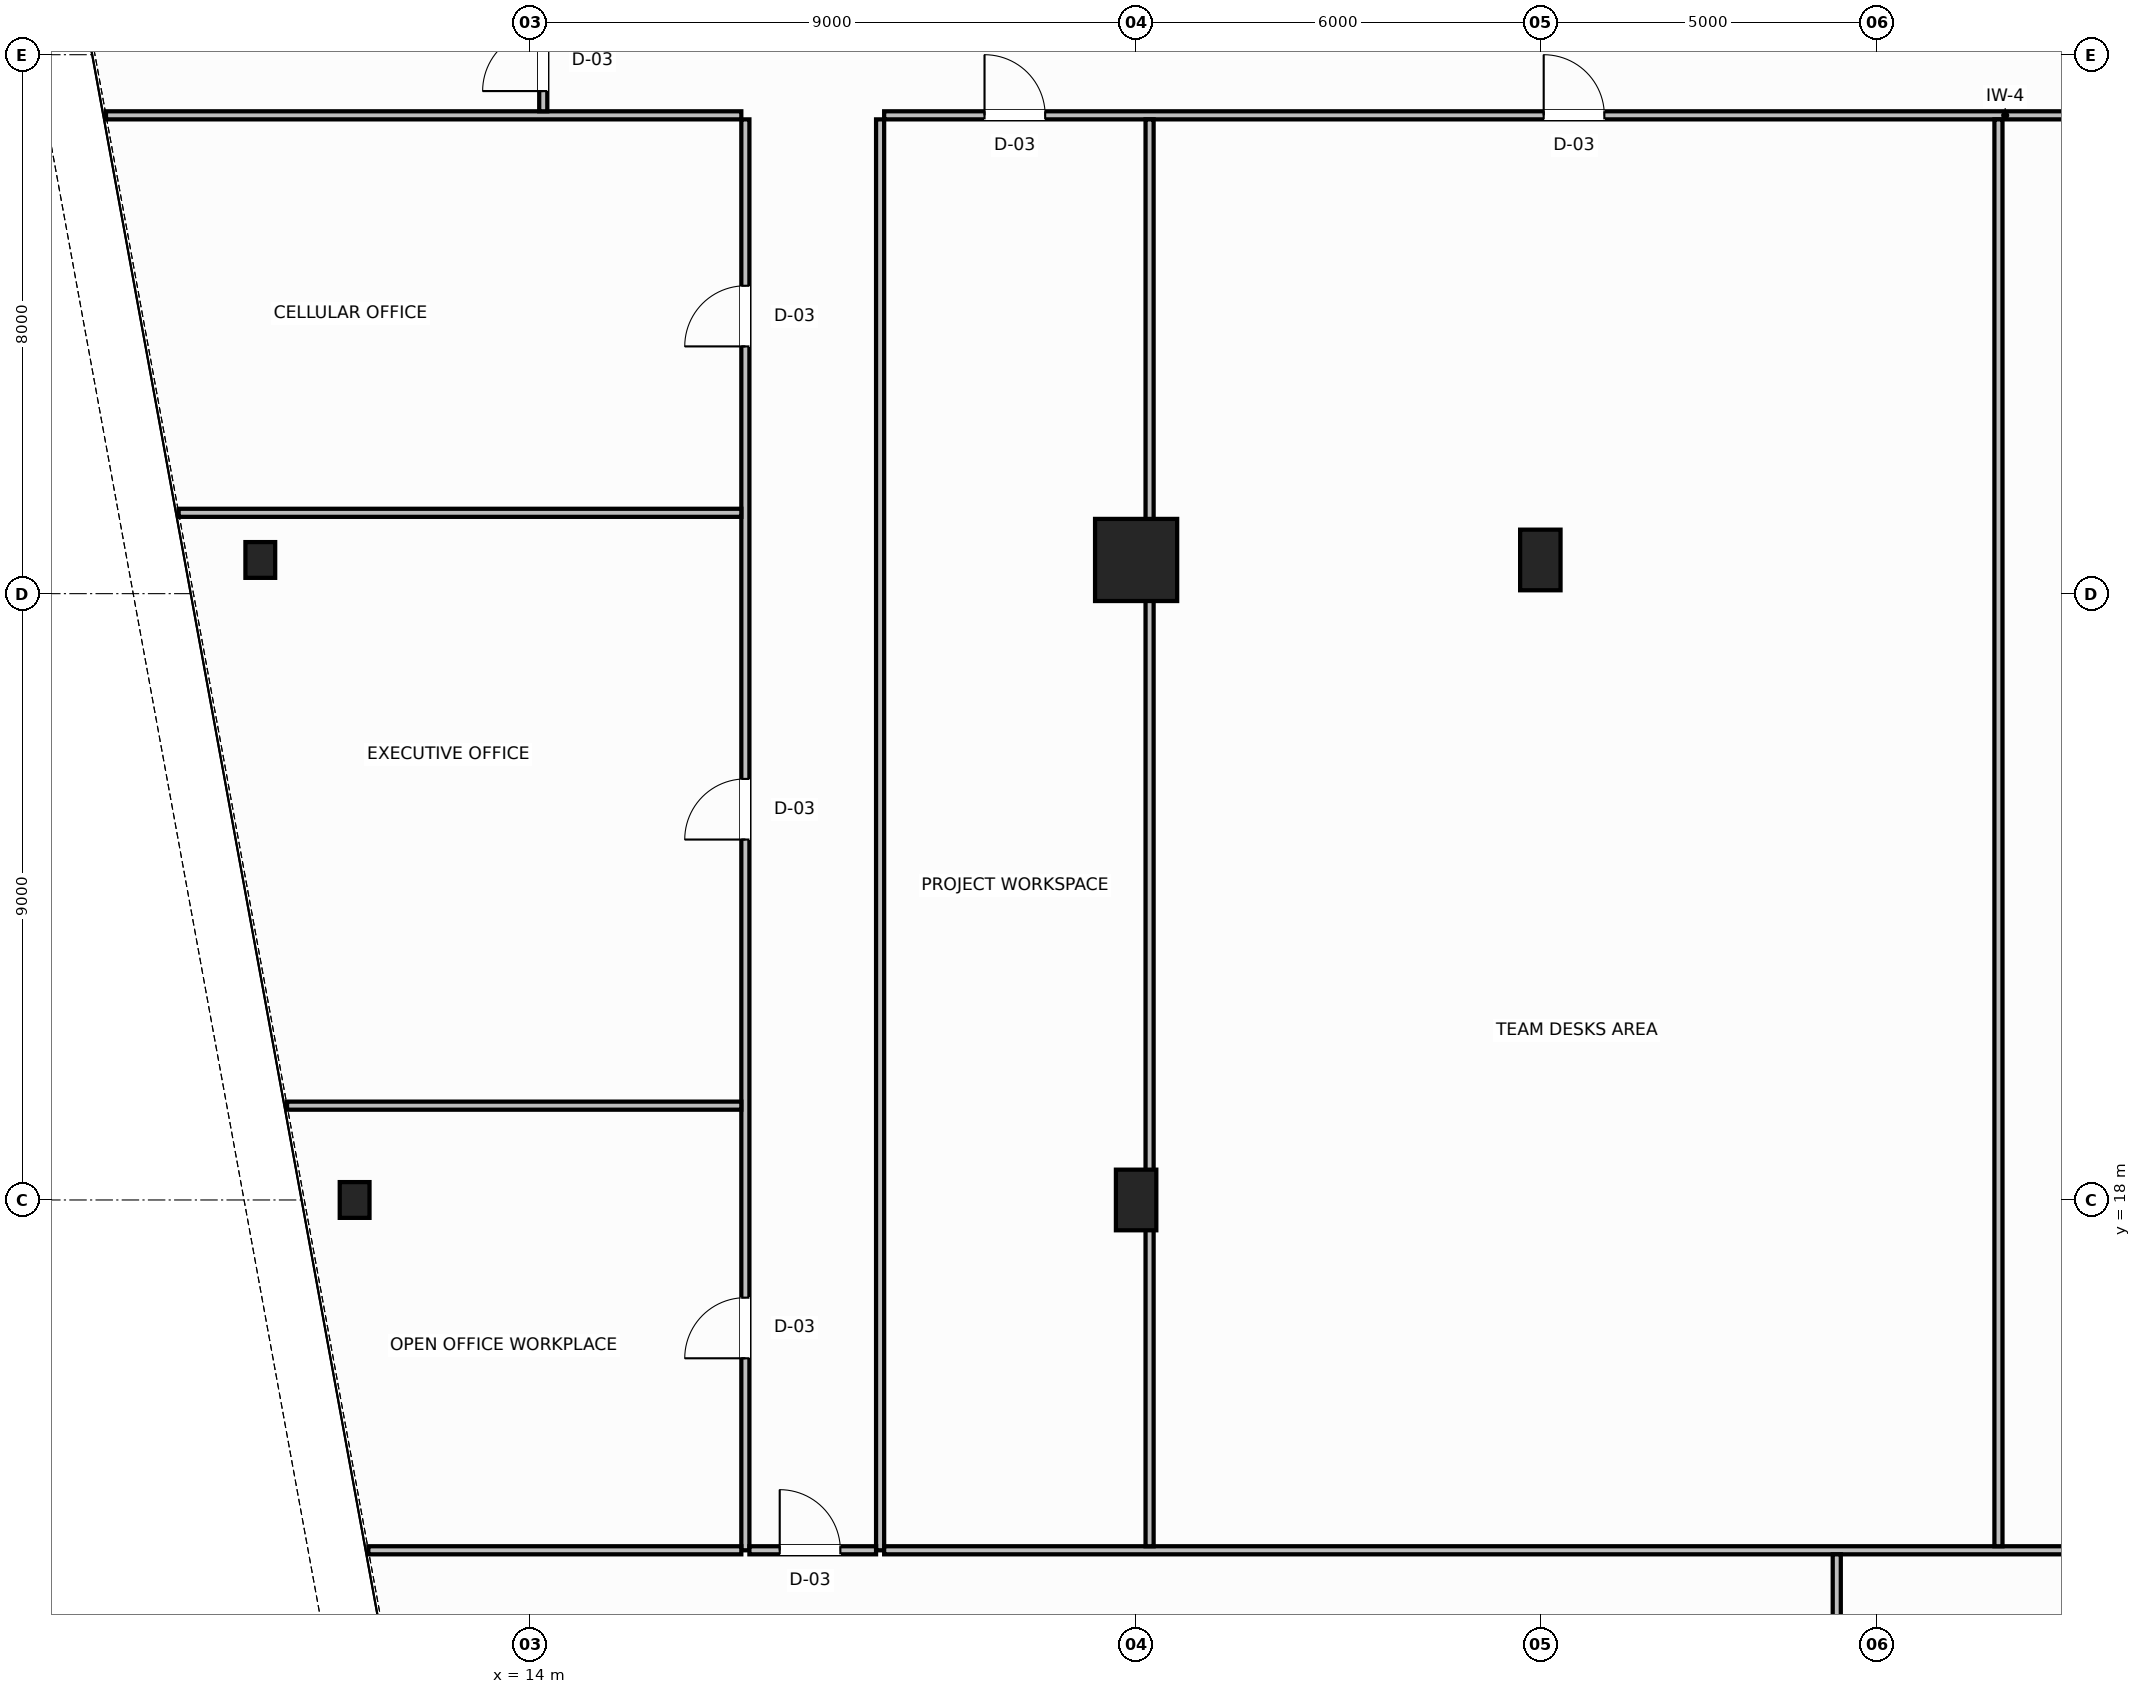
"""IFC4 building model, lengths in metres.
Left out: names, types, materials, properties, quantities, classifications, styles, units other than length and angle.
Written with IfcOpenShell. Run it as: python <this file> out.ifc"""

import sys

from ifc_helpers import new_model, si_unit, direction, frame, frame_2d, origin, origin_2d, place, context, subcontext, project, spatial, rectangle, hollow_rectangle, hollow_circle, i_section, extrude, source, transform, mapped, element, fill, save


model = new_model("IFC4")
c1 = context("Model", 3, precision=1e-05, world=origin(), true_north=direction((0.0, 1.0)))
c2 = subcontext(c1, "Body", "Model", "MODEL_VIEW")
j1 = project(units=[si_unit("LENGTHUNIT", "METRE"), si_unit("PLANEANGLEUNIT", "RADIAN")], contexts=[c1])
p1 = place(None, origin())
s1 = spatial("IfcSite", under=j1, at=p1, CompositionType="ELEMENT")
p2 = place(p1, origin())
s2 = spatial("IfcBuilding", under=s1, at=p2, CompositionType="ELEMENT")
p3 = place(p2, frame((0.0, 0.0, 79.6)))
s3 = spatial("IfcBuildingStorey", under=s2, at=p3, CompositionType="ELEMENT", Elevation=79.6)
m1 = source(origin(), c2, "Body", "SweptSolid", [
    extrude(i_section(OverallWidth=0.442, OverallDepth=0.531, WebThickness=0.065, FlangeThickness=0.076, FilletRadius=0.015, at=origin_2d()), origin(), (0.0, 0.0, 1.0), 3.8),
])
for number, where, z_axis, x_axis in (
    (1, (10.0, 27.5, 0.0), (0.0, 0.0, 1.0), (1.0, 0.0, 0.0)),
    (2, (11.4, 18.0, 0.0), (0.0, 0.0, 1.0), (1.0, 0.0, 0.0)),
):
    element("IfcColumn", number, at=place(p3, frame(where, z_axis=z_axis, x_axis=x_axis)), inside=s3, PredefinedType="COLUMN", context=c2, shape_type="MappedRepresentation", body=[
        mapped(m1, transform((0.0, 0.0, 0.0), scale=1.0)),
    ])
m2 = source(origin(), c2, "Body", "SweptSolid", [
    extrude(hollow_circle(Radius=0.61, WallThickness=0.05, at=origin_2d()), origin(), (0.0, 0.0, 1.0), 3.8),
])
p4 = place(p3, frame((23.0, 27.5, 0.0), z_axis=(0.0, 0.0, 1.0), x_axis=(1.0, 0.0, 0.0)))
e3 = element("IfcColumn", 3, at=p4, inside=s3, PredefinedType="COLUMN", context=c2, shape_type="MappedRepresentation", body=[
    mapped(m2, transform((0.0, 0.0, 0.0), scale=1.0)),
])
m3 = source(origin(), c2, "Body", "SweptSolid", [
    extrude(hollow_rectangle(XDim=0.6, YDim=0.9, WallThickness=0.04, InnerFilletRadius=0.04, OuterFilletRadius=0.08, at=origin_2d()), origin(), (0.0, 0.0, 1.0), 3.8),
])
for number, where, z_axis, x_axis in (
    (4, (29.0, 27.5, 0.0), (0.0, 0.0, 1.0), (1.0, 0.0, 0.0)),
    (5, (23.0, 18.0, 0.0), (0.0, 0.0, 1.0), (1.0, 0.0, 0.0)),
):
    element("IfcColumn", number, at=place(p3, frame(where, z_axis=z_axis, x_axis=x_axis)), inside=s3, PredefinedType="COLUMN", context=c2, shape_type="MappedRepresentation", body=[
        mapped(m3, transform((0.0, 0.0, 0.0), scale=1.0)),
    ])
p5 = place(p3, frame((19.26, 34.1, 0.0), z_axis=(0.0, 0.0, 1.0), x_axis=(1.0, 0.0, 0.0)))
e6 = element("IfcWall", 6, at=p5, inside=s3, PredefinedType="PARTITIONING", context=c2, shape_type="SweptSolid", body=[
    extrude(rectangle(XDim=29.48, YDim=0.12, at=frame_2d((14.74, 0.0))), origin(), (0.0, 0.0, 1.0), 3.54),
])
p6 = place(p5, frame((1.49, 0.0, 0.0)))
e7 = element("IfcOpeningElement", 7, at=p6, cuts=e6, PredefinedType="OPENING", context=c2, shape_type="SweptSolid", body=[
    extrude(rectangle(XDim=0.9, YDim=2.15, at=frame_2d((0.45, 1.075))), frame((0.0, 0.07, 0.0), z_axis=(0.0, -1.0, 0.0), x_axis=(1.0, 0.0, 0.0)), (0.0, 0.0, 1.0), 0.14),
])
p7 = place(p5, frame((9.79, 0.0, 0.0)))
e8 = element("IfcOpeningElement", 8, at=p7, cuts=e6, PredefinedType="OPENING", context=c2, shape_type="SweptSolid", body=[
    extrude(rectangle(XDim=0.9, YDim=2.15, at=frame_2d((0.45, 1.075))), frame((0.0, 0.07, 0.0), z_axis=(0.0, -1.0, 0.0), x_axis=(1.0, 0.0, 0.0)), (0.0, 0.0, 1.0), 0.14),
])
p8 = place(p5, frame((22.59, 0.0, 0.0)))
e9 = element("IfcOpeningElement", 9, at=p8, cuts=e6, PredefinedType="OPENING", context=c2, shape_type="SweptSolid", body=[
    extrude(rectangle(XDim=0.9, YDim=2.15, at=frame_2d((0.45, 1.075))), frame((0.0, 0.07, 0.0), z_axis=(0.0, -1.0, 0.0), x_axis=(1.0, 0.0, 0.0)), (0.0, 0.0, 1.0), 0.14),
])
p9 = place(p3, frame((7.709, 34.1, 0.0), z_axis=(0.0, 0.0, 1.0), x_axis=(1.0, 0.0, 0.0)))
e10 = element("IfcWall", 10, at=p9, inside=s3, PredefinedType="PARTITIONING", context=c2, shape_type="SweptSolid", body=[
    extrude(rectangle(XDim=9.431, YDim=0.12, at=frame_2d((4.715, 0.0))), origin(), (0.0, 0.0, 1.0), 3.54),
])
p10 = place(p3, frame((14.2, 34.16, 0.0), z_axis=(0.0, 0.0, 1.0), x_axis=(0.0, 1.0, 0.0)))
e11 = element("IfcWall", 11, at=p10, inside=s3, PredefinedType="PARTITIONING", context=c2, shape_type="SweptSolid", body=[
    extrude(rectangle(XDim=2.28, YDim=0.12, at=frame_2d((1.14, 0.0))), origin(), (0.0, 0.0, 1.0), 3.54),
])
p11 = place(p10, frame((0.3, 0.0, 0.0)))
e12 = element("IfcOpeningElement", 12, at=p11, cuts=e11, PredefinedType="OPENING", context=c2, shape_type="SweptSolid", body=[
    extrude(rectangle(XDim=0.9, YDim=2.15, at=frame_2d((0.45, 1.075))), frame((0.0, 0.07, 0.0), z_axis=(0.0, -1.0, 0.0), x_axis=(1.0, 0.0, 0.0)), (0.0, 0.0, 1.0), 0.14),
])
p12 = place(p3, frame((17.2, 12.8, 0.0), z_axis=(0.0, 0.0, 1.0), x_axis=(0.0, 1.0, 0.0)))
e13 = element("IfcWall", 13, at=p12, inside=s3, PredefinedType="PARTITIONING", context=c2, shape_type="SweptSolid", body=[
    extrude(rectangle(XDim=21.24, YDim=0.12, at=frame_2d((10.62, 0.0))), origin(), (0.0, 0.0, 1.0), 3.54),
])
p13 = place(p12, frame((2.85, 0.0, 0.0)))
e14 = element("IfcOpeningElement", 14, at=p13, cuts=e13, PredefinedType="OPENING", context=c2, shape_type="SweptSolid", body=[
    extrude(rectangle(XDim=0.9, YDim=2.15, at=frame_2d((0.45, 1.075))), frame((0.0, 0.07, 0.0), z_axis=(0.0, -1.0, 0.0), x_axis=(1.0, 0.0, 0.0)), (0.0, 0.0, 1.0), 0.14),
])
p14 = place(p12, frame((10.55, 0.0, 0.0)))
e15 = element("IfcOpeningElement", 15, at=p14, cuts=e13, PredefinedType="OPENING", context=c2, shape_type="SweptSolid", body=[
    extrude(rectangle(XDim=0.9, YDim=2.15, at=frame_2d((0.45, 1.075))), frame((0.0, 0.07, 0.0), z_axis=(0.0, -1.0, 0.0), x_axis=(1.0, 0.0, 0.0)), (0.0, 0.0, 1.0), 0.14),
])
p15 = place(p12, frame((17.87, 0.0, 0.0)))
e16 = element("IfcOpeningElement", 16, at=p15, cuts=e13, PredefinedType="OPENING", context=c2, shape_type="SweptSolid", body=[
    extrude(rectangle(XDim=0.9, YDim=2.15, at=frame_2d((0.45, 1.075))), frame((0.0, 0.07, 0.0), z_axis=(0.0, -1.0, 0.0), x_axis=(1.0, 0.0, 0.0)), (0.0, 0.0, 1.0), 0.14),
])
p16 = place(p3, frame((19.2, 12.8, 0.0), z_axis=(0.0, 0.0, 1.0), x_axis=(0.0, 1.0, 0.0)))
e17 = element("IfcWall", 17, at=p16, inside=s3, PredefinedType="PARTITIONING", context=c2, shape_type="SweptSolid", body=[
    extrude(rectangle(XDim=21.24, YDim=0.12, at=frame_2d((10.62, 0.0))), origin(), (0.0, 0.0, 1.0), 3.54),
])
p17 = place(p3, frame((17.26, 12.8, 0.0), z_axis=(0.0, 0.0, 1.0), x_axis=(1.0, 0.0, 0.0)))
e18 = element("IfcWall", 18, at=p17, inside=s3, PredefinedType="PARTITIONING", context=c2, shape_type="SweptSolid", body=[
    extrude(rectangle(XDim=1.88, YDim=0.12, at=frame_2d((0.94, 0.0))), origin(), (0.0, 0.0, 1.0), 3.54),
])
p18 = place(p17, frame((0.45, 0.0, 0.0)))
e19 = element("IfcOpeningElement", 19, at=p18, cuts=e18, PredefinedType="OPENING", context=c2, shape_type="SweptSolid", body=[
    extrude(rectangle(XDim=0.9, YDim=2.15, at=frame_2d((0.45, 1.075))), frame((0.0, 0.07, 0.0), z_axis=(0.0, -1.0, 0.0), x_axis=(1.0, 0.0, 0.0)), (0.0, 0.0, 1.0), 0.14),
])
p19 = place(p3, frame((11.604, 12.8, 0.0), z_axis=(0.0, 0.0, 1.0), x_axis=(1.0, 0.0, 0.0)))
e20 = element("IfcWall", 20, at=p19, inside=s3, PredefinedType="PARTITIONING", context=c2, shape_type="SweptSolid", body=[
    extrude(rectangle(XDim=5.536, YDim=0.12, at=frame_2d((2.768, 0.0))), origin(), (0.0, 0.0, 1.0), 3.54),
])
p20 = place(p3, frame((10.397, 19.4, 0.0), z_axis=(0.0, 0.0, 1.0), x_axis=(1.0, 0.0, 0.0)))
e21 = element("IfcWall", 21, at=p20, inside=s3, PredefinedType="PARTITIONING", context=c2, shape_type="SweptSolid", body=[
    extrude(rectangle(XDim=6.743, YDim=0.12, at=frame_2d((3.372, 0.0))), origin(), (0.0, 0.0, 1.0), 3.54),
])
p21 = place(p3, frame((8.788, 28.2, 0.0), z_axis=(0.0, 0.0, 1.0), x_axis=(1.0, 0.0, 0.0)))
e22 = element("IfcWall", 22, at=p21, inside=s3, PredefinedType="PARTITIONING", context=c2, shape_type="SweptSolid", body=[
    extrude(rectangle(XDim=8.352, YDim=0.12, at=frame_2d((4.176, 0.0))), origin(), (0.0, 0.0, 1.0), 3.54),
])
p22 = place(p3, frame((19.26, 12.8, 0.0), z_axis=(0.0, 0.0, 1.0), x_axis=(1.0, 0.0, 0.0)))
e23 = element("IfcWall", 23, at=p22, inside=s3, PredefinedType="PARTITIONING", context=c2, shape_type="SweptSolid", body=[
    extrude(rectangle(XDim=29.48, YDim=0.12, at=frame_2d((14.74, 0.0))), origin(), (0.0, 0.0, 1.0), 3.54),
])
p23 = place(p3, frame((23.2, 12.86, 0.0), z_axis=(0.0, 0.0, 1.0), x_axis=(0.0, 1.0, 0.0)))
e24 = element("IfcWall", 24, at=p23, inside=s3, PredefinedType="PARTITIONING", context=c2, shape_type="SweptSolid", body=[
    extrude(rectangle(XDim=21.18, YDim=0.12, at=frame_2d((10.59, 0.0))), origin(), (0.0, 0.0, 1.0), 2.73),
])
p24 = place(p3, frame((35.8, 12.86, 0.0), z_axis=(0.0, 0.0, 1.0), x_axis=(0.0, 1.0, 0.0)))
e25 = element("IfcWall", 25, at=p24, inside=s3, PredefinedType="PARTITIONING", context=c2, shape_type="SweptSolid", body=[
    extrude(rectangle(XDim=21.18, YDim=0.12, at=frame_2d((10.59, 0.0))), origin(), (0.0, 0.0, 1.0), 3.54),
])
p25 = place(p3, frame((33.4, 8.665, 0.0), z_axis=(0.0, 0.0, 1.0), x_axis=(0.0, 1.0, 0.0)))
e26 = element("IfcWall", 26, at=p25, inside=s3, PredefinedType="PARTITIONING", context=c2, shape_type="SweptSolid", body=[
    extrude(rectangle(XDim=4.075, YDim=0.12, at=frame_2d((2.037, 0.0))), origin(), (0.0, 0.0, 1.0), 3.54),
])
p26 = place(p25, frame((1.587, 0.0, 0.0)))
e27 = element("IfcOpeningElement", 27, at=p26, cuts=e26, PredefinedType="OPENING", context=c2, shape_type="SweptSolid", body=[
    extrude(rectangle(XDim=0.9, YDim=2.15, at=frame_2d((0.45, 1.075))), frame((0.0, 0.07, 0.0), z_axis=(0.0, -1.0, 0.0), x_axis=(1.0, 0.0, 0.0)), (0.0, 0.0, 1.0), 0.14),
])
m4 = source(origin(), c2, "Body", "SweptSolid", [
    extrude(rectangle(XDim=0.9, YDim=2.15, at=frame_2d((0.45, 1.075))), frame((0.0, 0.025, 0.0), z_axis=(0.0, -1.0, 0.0), x_axis=(1.0, 0.0, 0.0)), (0.0, 0.0, 1.0), 0.05),
])
p27 = place(p11, origin())
e28 = element("IfcDoor", 28, at=p27, inside=s3, OperationType="SINGLE_SWING_LEFT", PredefinedType="DOOR", context=c2, shape_type="MappedRepresentation", body=[
    mapped(m4, transform((0.0, 0.0, 0.0), scale=1.0)),
])
fill(e12, e28)
p28 = place(p13, origin())
e29 = element("IfcDoor", 29, at=p28, inside=s3, OperationType="SINGLE_SWING_LEFT", PredefinedType="DOOR", context=c2, shape_type="MappedRepresentation", body=[
    mapped(m4, transform((0.0, 0.0, 0.0), scale=1.0)),
])
fill(e14, e29)
p29 = place(p14, origin())
e30 = element("IfcDoor", 30, at=p29, inside=s3, OperationType="SINGLE_SWING_RIGHT", PredefinedType="DOOR", context=c2, shape_type="MappedRepresentation", body=[
    mapped(m4, transform((0.0, 0.0, 0.0), scale=1.0)),
])
fill(e15, e30)
p30 = place(p15, origin())
e31 = element("IfcDoor", 31, at=p30, inside=s3, OperationType="SINGLE_SWING_LEFT", PredefinedType="DOOR", context=c2, shape_type="MappedRepresentation", body=[
    mapped(m4, transform((0.0, 0.0, 0.0), scale=1.0)),
])
fill(e16, e31)
p31 = place(p6, origin())
e32 = element("IfcDoor", 32, at=p31, inside=s3, OperationType="SINGLE_SWING_LEFT", PredefinedType="DOOR", context=c2, shape_type="MappedRepresentation", body=[
    mapped(m4, transform((0.0, 0.0, 0.0), scale=1.0)),
])
fill(e7, e32)
p32 = place(p7, origin())
e33 = element("IfcDoor", 33, at=p32, inside=s3, OperationType="SINGLE_SWING_RIGHT", PredefinedType="DOOR", context=c2, shape_type="MappedRepresentation", body=[
    mapped(m4, transform((0.0, 0.0, 0.0), scale=1.0)),
])
fill(e8, e33)
p33 = place(p18, origin())
e34 = element("IfcDoor", 34, at=p33, inside=s3, OperationType="SINGLE_SWING_LEFT", PredefinedType="DOOR", context=c2, shape_type="MappedRepresentation", body=[
    mapped(m4, transform((0.0, 0.0, 0.0), scale=1.0)),
])
fill(e19, e34)
save(model, sys.argv[1])
